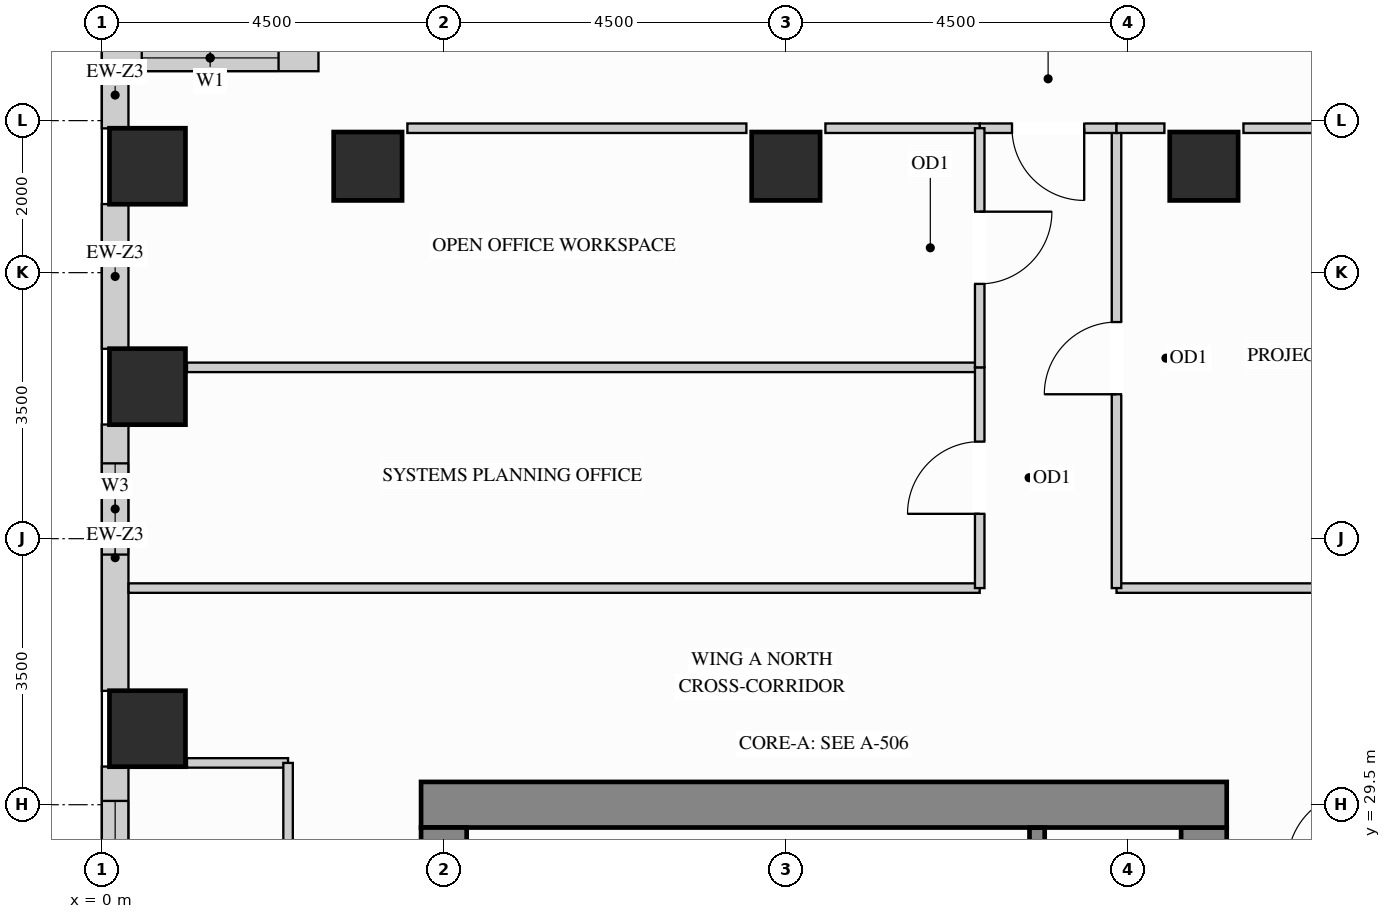
"""IFC4 building model, lengths in metres.
Left out: names, types, materials, properties, quantities, classifications, styles, units other than length and angle.
Written with IfcOpenShell. Run it as: python <this file> out.ifc"""

import sys

from ifc_helpers import new_model, si_unit, direction, frame, frame_2d, origin, origin_2d, place, context, subcontext, project, spatial, rectangle, extrude, source, transform, mapped, element, fill, save


model = new_model("IFC4")
c1 = context("Model", 3, precision=1e-05, world=origin(), true_north=direction((0.0, 1.0)))
c2 = subcontext(c1, "Body", "Model", "MODEL_VIEW")
j1 = project(units=[si_unit("LENGTHUNIT", "METRE"), si_unit("PLANEANGLEUNIT", "RADIAN")], contexts=[c1])
p1 = place(None, origin())
s1 = spatial("IfcSite", under=j1, at=p1, CompositionType="ELEMENT")
p2 = place(p1, origin())
s2 = spatial("IfcBuilding", under=s1, at=p2, CompositionType="ELEMENT")
p3 = place(p2, frame((0.0, 0.0, 171.9)))
s3 = spatial("IfcBuildingStorey", under=s2, at=p3, CompositionType="ELEMENT", Elevation=171.9)
m1 = source(origin(), c2, "Body", "SweptSolid", [
    extrude(rectangle(XDim=0.9, YDim=0.9, at=origin_2d()), origin(), (0.0, 0.0, 1.0), 3.4),
])
for number, where, z_axis, x_axis in (
    (1, (14.5, 37.9, 0.0), (0.0, 0.0, 1.0), (1.0, 0.0, 0.0)),
    (2, (3.5, 37.9, 0.0), (0.0, 0.0, 1.0), (1.0, 0.0, 0.0)),
    (3, (9.0, 37.9, 0.0), (0.0, 0.0, 1.0), (1.0, 0.0, 0.0)),
):
    element("IfcColumn", number, at=place(p3, frame(where, z_axis=z_axis, x_axis=x_axis)), inside=s3, PredefinedType="COLUMN", context=c2, shape_type="MappedRepresentation", body=[
        mapped(m1, transform((0.0, 0.0, 0.0), x_axis=(1.0, 0.0, 0.0), y_axis=(0.0, 1.0, 0.0), z_axis=(0.0, 0.0, 1.0))),
    ])
m2 = source(origin(), c2, "Body", "SweptSolid", [
    extrude(rectangle(XDim=1.0, YDim=1.0, at=origin_2d()), origin(), (0.0, 0.0, 1.0), 3.4),
])
for number, where, z_axis, x_axis in (
    (4, (0.6, 30.5, 0.0), (0.0, 0.0, 1.0), (1.0, 0.0, 0.0)),
    (5, (0.6, 35.0, 0.0), (0.0, 0.0, 1.0), (1.0, 0.0, 0.0)),
    (6, (0.6, 37.9, 0.0), (0.0, 0.0, 1.0), (1.0, 0.0, 0.0)),
):
    element("IfcColumn", number, at=place(p3, frame(where, z_axis=z_axis, x_axis=x_axis)), inside=s3, PredefinedType="COLUMN", context=c2, shape_type="MappedRepresentation", body=[
        mapped(m2, transform((0.0, 0.0, 0.0), x_axis=(1.0, 0.0, 0.0), y_axis=(0.0, 1.0, 0.0), z_axis=(0.0, 0.0, 1.0))),
    ])
m3 = source(origin(), c2, "Body", "SweptSolid", [
    extrude(rectangle(XDim=8.32, YDim=0.6, at=frame_2d((4.16, 0.0))), origin(), (0.0, 0.0, 1.0), 3.4),
])
p4 = place(p3, frame((14.5, 20.88, 0.0), z_axis=(0.0, 0.0, 1.0), x_axis=(0.0, 1.0, 0.0)))
e7 = element("IfcWall", 7, at=p4, inside=s3, PredefinedType="SHEAR", context=c2, shape_type="MappedRepresentation", body=[
    mapped(m3, transform((0.0, 0.0, 0.0), x_axis=(1.0, 0.0, 0.0), y_axis=(0.0, 1.0, 0.0), z_axis=(0.0, 0.0, 1.0))),
])
m4 = source(origin(), c2, "Body", "SweptSolid", [
    extrude(rectangle(XDim=10.6, YDim=0.6, at=frame_2d((5.3, 0.0))), origin(), (0.0, 0.0, 1.0), 3.4),
])
p5 = place(p3, frame((4.2, 29.5, 0.0), z_axis=(0.0, 0.0, 1.0), x_axis=(1.0, 0.0, 0.0)))
e8 = element("IfcWall", 8, at=p5, inside=s3, PredefinedType="SHEAR", context=c2, shape_type="MappedRepresentation", body=[
    mapped(m4, transform((0.0, 0.0, 0.0), x_axis=(1.0, 0.0, 0.0), y_axis=(0.0, 1.0, 0.0), z_axis=(0.0, 0.0, 1.0))),
])
m5 = source(origin(), c2, "Body", "SweptSolid", [
    extrude(rectangle(XDim=20.4, YDim=0.6, at=frame_2d((10.2, 0.0))), origin(), (0.0, 0.0, 1.0), 3.4),
])
p6 = place(p3, frame((4.5, 8.8, 0.0), z_axis=(0.0, 0.0, 1.0), x_axis=(0.0, 1.0, 0.0)))
e9 = element("IfcWall", 9, at=p6, inside=s3, PredefinedType="SHEAR", context=c2, shape_type="MappedRepresentation", body=[
    mapped(m5, transform((0.0, 0.0, 0.0), x_axis=(1.0, 0.0, 0.0), y_axis=(0.0, 1.0, 0.0), z_axis=(0.0, 0.0, 1.0))),
])
p7 = place(p3, frame((2.85, 39.325, 0.0), z_axis=(0.0, 0.0, 1.0), x_axis=(-1.0, 0.0, 0.0)))
e10 = element("IfcWall", 10, at=p7, inside=s3, PredefinedType="SOLIDWALL", context=c2, shape_type="SweptSolid", body=[
    extrude(rectangle(XDim=2.85, YDim=0.35, at=frame_2d((1.425, 0.0))), origin(), (0.0, 0.0, 1.0), 3.385),
])
p8 = place(p7, frame((0.525, 0.0, 0.78)))
e11 = element("IfcOpeningElement", 11, at=p8, cuts=e10, PredefinedType="OPENING", context=c2, shape_type="SweptSolid", body=[
    extrude(rectangle(XDim=1.8, YDim=2.1, at=frame_2d((0.9, 1.05))), frame((0.0, 0.185, 0.0), z_axis=(0.0, -1.0, 0.0), x_axis=(1.0, 0.0, 0.0)), (0.0, 0.0, 1.0), 0.37),
])
m6 = source(origin(), c2, "Body", "SweptSolid", [
    extrude(rectangle(XDim=0.754, YDim=0.35, at=frame_2d((0.377, 0.0))), origin(), (0.0, 0.0, 1.0), 3.385),
])
p9 = place(p3, frame((0.175, 39.152, 0.0), z_axis=(0.0, 0.0, 1.0), x_axis=(0.0, -1.0, 0.0)))
e12 = element("IfcWall", 12, at=p9, inside=s3, PredefinedType="SOLIDWALL", context=c2, shape_type="MappedRepresentation", body=[
    mapped(m6, transform((0.0, 0.0, 0.0), x_axis=(1.0, 0.0, 0.0), y_axis=(0.0, 1.0, 0.0), z_axis=(0.0, 0.0, 1.0))),
])
m7 = source(origin(), c2, "Body", "SweptSolid", [
    extrude(rectangle(XDim=1.904, YDim=0.35, at=frame_2d((0.952, 0.0))), origin(), (0.0, 0.0, 1.0), 2.612),
])
p10 = place(p3, frame((0.175, 37.402, 0.0), z_axis=(0.0, 0.0, 1.0), x_axis=(0.0, -1.0, 0.0)))
e13 = element("IfcWall", 13, at=p10, inside=s3, PredefinedType="SOLIDWALL", context=c2, shape_type="MappedRepresentation", body=[
    mapped(m7, transform((0.0, 0.0, 0.0), x_axis=(1.0, 0.0, 0.0), y_axis=(0.0, 1.0, 0.0), z_axis=(0.0, 0.0, 1.0))),
])
p11 = place(p3, frame((0.175, 34.502, 0.0), z_axis=(0.0, 0.0, 1.0), x_axis=(0.0, -1.0, 0.0)))
e14 = element("IfcWall", 14, at=p11, inside=s3, PredefinedType="SOLIDWALL", context=c2, shape_type="SweptSolid", body=[
    extrude(rectangle(XDim=3.504, YDim=0.35, at=frame_2d((1.752, 0.0))), origin(), (0.0, 0.0, 1.0), 2.612),
])
p12 = place(p11, frame((0.511, 0.0, 0.78)))
e15 = element("IfcOpeningElement", 15, at=p12, cuts=e14, PredefinedType="OPENING", context=c2, shape_type="SweptSolid", body=[
    extrude(rectangle(XDim=1.2, YDim=1.652, at=frame_2d((0.6, 0.826))), frame((0.0, 0.185, 0.0), z_axis=(0.0, -1.0, 0.0), x_axis=(1.0, 0.0, 0.0)), (0.0, 0.0, 1.0), 0.37),
])
p13 = place(p3, frame((0.175, 30.002, 0.0), z_axis=(0.0, 0.0, 1.0), x_axis=(0.0, -1.0, 0.0)))
e16 = element("IfcWall", 16, at=p13, inside=s3, PredefinedType="SOLIDWALL", context=c2, shape_type="SweptSolid", body=[
    extrude(rectangle(XDim=2.704, YDim=0.35, at=frame_2d((1.352, 0.0))), origin(), (0.0, 0.0, 1.0), 2.612),
])
p14 = place(p13, frame((0.452, 0.0, 0.78)))
e17 = element("IfcOpeningElement", 17, at=p14, cuts=e16, PredefinedType="OPENING", context=c2, shape_type="SweptSolid", body=[
    extrude(rectangle(XDim=1.8, YDim=1.652, at=frame_2d((0.9, 0.826))), frame((0.0, 0.185, 0.0), z_axis=(0.0, -1.0, 0.0), x_axis=(1.0, 0.0, 0.0)), (0.0, 0.0, 1.0), 0.37),
])
m8 = source(origin(), c2, "Body", "SweptSolid", [
    extrude(rectangle(XDim=5.798, YDim=0.125, at=frame_2d((2.899, 0.0))), origin(), (0.0, 0.0, 1.0), 3.385),
])
p15 = place(p3, frame((13.35, 32.35, 0.0), z_axis=(0.0, 0.0, 1.0), x_axis=(1.0, 0.0, 0.0)))
e18 = element("IfcWall", 18, at=p15, inside=s3, PredefinedType="PARTITIONING", context=c2, shape_type="MappedRepresentation", body=[
    mapped(m8, transform((0.0, 0.0, 0.0), x_axis=(1.0, 0.0, 0.0), y_axis=(0.0, 1.0, 0.0), z_axis=(0.0, 0.0, 1.0))),
])
m9 = source(origin(), c2, "Body", "SweptSolid", [
    extrude(rectangle(XDim=11.198, YDim=0.125, at=frame_2d((5.599, 0.0))), origin(), (0.0, 0.0, 1.0), 3.385),
])
p16 = place(p3, frame((0.352, 32.35, 0.0), z_axis=(0.0, 0.0, 1.0), x_axis=(1.0, 0.0, 0.0)))
e19 = element("IfcWall", 19, at=p16, inside=s3, PredefinedType="PARTITIONING", context=c2, shape_type="MappedRepresentation", body=[
    mapped(m9, transform((0.0, 0.0, 0.0), x_axis=(1.0, 0.0, 0.0), y_axis=(0.0, 1.0, 0.0), z_axis=(0.0, 0.0, 1.0))),
])
m10 = source(origin(), c2, "Body", "SweptSolid", [
    extrude(rectangle(XDim=10.43, YDim=0.125, at=frame_2d((5.215, 0.0))), origin(), (0.0, 0.0, 1.0), 3.385),
])
p17 = place(p3, frame((1.12, 35.254, 0.0), z_axis=(0.0, 0.0, 1.0), x_axis=(1.0, 0.0, 0.0)))
e20 = element("IfcWall", 20, at=p17, inside=s3, PredefinedType="PARTITIONING", context=c2, shape_type="MappedRepresentation", body=[
    mapped(m10, transform((0.0, 0.0, 0.0), x_axis=(1.0, 0.0, 0.0), y_axis=(0.0, 1.0, 0.0), z_axis=(0.0, 0.0, 1.0))),
])
m11 = source(origin(), c2, "Body", "SweptSolid", [
    extrude(rectangle(XDim=1.33, YDim=0.125, at=frame_2d((0.665, 0.0))), origin(), (0.0, 0.0, 1.0), 3.385),
])
p18 = place(p3, frame((1.12, 30.05, 0.0), z_axis=(0.0, 0.0, 1.0), x_axis=(1.0, 0.0, 0.0)))
e21 = element("IfcWall", 21, at=p18, inside=s3, PredefinedType="PARTITIONING", context=c2, shape_type="MappedRepresentation", body=[
    mapped(m11, transform((0.0, 0.0, 0.0), x_axis=(1.0, 0.0, 0.0), y_axis=(0.0, 1.0, 0.0), z_axis=(0.0, 0.0, 1.0))),
])
p19 = place(p3, frame((13.35, 32.35, 0.0), z_axis=(0.0, 0.0, 1.0), x_axis=(0.0, 1.0, 0.0)))
e22 = element("IfcWall", 22, at=p19, inside=s3, PredefinedType="PARTITIONING", context=c2, shape_type="SweptSolid", body=[
    extrude(rectangle(XDim=6.05, YDim=0.125, at=frame_2d((3.025, 0.0))), origin(), (0.0, 0.0, 1.0), 3.385),
])
p20 = place(p19, frame((2.55, 0.0, 0.0)))
e23 = element("IfcOpeningElement", 23, at=p20, cuts=e22, PredefinedType="OPENING", context=c2, shape_type="SweptSolid", body=[
    extrude(rectangle(XDim=0.95, YDim=2.15, at=frame_2d((0.475, 1.075))), frame((0.0, 0.073, 0.0), z_axis=(0.0, -1.0, 0.0), x_axis=(1.0, 0.0, 0.0)), (0.0, 0.0, 1.0), 0.145),
])
p21 = place(p3, frame((11.55, 38.4, 0.0), z_axis=(0.0, 0.0, 1.0), x_axis=(1.0, 0.0, 0.0)))
e24 = element("IfcWall", 24, at=p21, inside=s3, PredefinedType="PARTITIONING", context=c2, shape_type="SweptSolid", body=[
    extrude(rectangle(XDim=1.8, YDim=0.125, at=frame_2d((0.9, 0.0))), origin(), (0.0, 0.0, 1.0), 3.385),
])
p22 = place(p21, frame((0.425, 0.0, 0.0)))
e25 = element("IfcOpeningElement", 25, at=p22, cuts=e24, PredefinedType="OPENING", context=c2, shape_type="SweptSolid", body=[
    extrude(rectangle(XDim=0.95, YDim=2.15, at=frame_2d((0.475, 1.075))), frame((0.0, 0.073, 0.0), z_axis=(0.0, -1.0, 0.0), x_axis=(1.0, 0.0, 0.0)), (0.0, 0.0, 1.0), 0.145),
])
m12 = source(origin(), c2, "Body", "SweptSolid", [
    extrude(rectangle(XDim=0.63, YDim=0.125, at=frame_2d((0.315, 0.0))), origin(), (0.0, 0.0, 1.0), 3.385),
])
p23 = place(p3, frame((13.35, 38.4, 0.0), z_axis=(0.0, 0.0, 1.0), x_axis=(1.0, 0.0, 0.0)))
e26 = element("IfcWall", 26, at=p23, inside=s3, PredefinedType="PARTITIONING", context=c2, shape_type="MappedRepresentation", body=[
    mapped(m12, transform((0.0, 0.0, 0.0), x_axis=(1.0, 0.0, 0.0), y_axis=(0.0, 1.0, 0.0), z_axis=(0.0, 0.0, 1.0))),
])
m13 = source(origin(), c2, "Body", "SweptSolid", [
    extrude(rectangle(XDim=1.88, YDim=0.125, at=frame_2d((0.94, 0.0))), origin(), (0.0, 0.0, 1.0), 3.385),
])
p24 = place(p3, frame((15.02, 38.4, 0.0), z_axis=(0.0, 0.0, 1.0), x_axis=(1.0, 0.0, 0.0)))
e27 = element("IfcWall", 27, at=p24, inside=s3, PredefinedType="PARTITIONING", context=c2, shape_type="MappedRepresentation", body=[
    mapped(m13, transform((0.0, 0.0, 0.0), x_axis=(1.0, 0.0, 0.0), y_axis=(0.0, 1.0, 0.0), z_axis=(0.0, 0.0, 1.0))),
])
m14 = source(origin(), c2, "Body", "SweptSolid", [
    extrude(rectangle(XDim=4.46, YDim=0.125, at=frame_2d((2.23, 0.0))), origin(), (0.0, 0.0, 1.0), 3.385),
])
p25 = place(p3, frame((4.02, 38.4, 0.0), z_axis=(0.0, 0.0, 1.0), x_axis=(1.0, 0.0, 0.0)))
e28 = element("IfcWall", 28, at=p25, inside=s3, PredefinedType="PARTITIONING", context=c2, shape_type="MappedRepresentation", body=[
    mapped(m14, transform((0.0, 0.0, 0.0), x_axis=(1.0, 0.0, 0.0), y_axis=(0.0, 1.0, 0.0), z_axis=(0.0, 0.0, 1.0))),
])
m15 = source(origin(), c2, "Body", "SweptSolid", [
    extrude(rectangle(XDim=2.03, YDim=0.125, at=frame_2d((1.015, 0.0))), origin(), (0.0, 0.0, 1.0), 3.385),
])
p26 = place(p3, frame((9.52, 38.4, 0.0), z_axis=(0.0, 0.0, 1.0), x_axis=(1.0, 0.0, 0.0)))
e29 = element("IfcWall", 29, at=p26, inside=s3, PredefinedType="PARTITIONING", context=c2, shape_type="MappedRepresentation", body=[
    mapped(m15, transform((0.0, 0.0, 0.0), x_axis=(1.0, 0.0, 0.0), y_axis=(0.0, 1.0, 0.0), z_axis=(0.0, 0.0, 1.0))),
])
p27 = place(p3, frame((11.55, 32.35, 0.0), z_axis=(0.0, 0.0, 1.0), x_axis=(0.0, 1.0, 0.0)))
e30 = element("IfcWall", 30, at=p27, inside=s3, PredefinedType="PARTITIONING", context=c2, shape_type="SweptSolid", body=[
    extrude(rectangle(XDim=2.904, YDim=0.125, at=frame_2d((1.452, 0.0))), origin(), (0.0, 0.0, 1.0), 3.385),
])
p28 = place(p27, frame((0.977, 0.0, 0.0)))
e31 = element("IfcOpeningElement", 31, at=p28, cuts=e30, PredefinedType="OPENING", context=c2, shape_type="SweptSolid", body=[
    extrude(rectangle(XDim=0.95, YDim=2.15, at=frame_2d((0.475, 1.075))), frame((0.0, 0.073, 0.0), z_axis=(0.0, -1.0, 0.0), x_axis=(1.0, 0.0, 0.0)), (0.0, 0.0, 1.0), 0.145),
])
p29 = place(p3, frame((11.55, 35.254, 0.0), z_axis=(0.0, 0.0, 1.0), x_axis=(0.0, 1.0, 0.0)))
e32 = element("IfcWall", 32, at=p29, inside=s3, PredefinedType="PARTITIONING", context=c2, shape_type="SweptSolid", body=[
    extrude(rectangle(XDim=3.146, YDim=0.125, at=frame_2d((1.573, 0.0))), origin(), (0.0, 0.0, 1.0), 3.385),
])
p30 = place(p29, frame((1.098, 0.0, 0.0)))
e33 = element("IfcOpeningElement", 33, at=p30, cuts=e32, PredefinedType="OPENING", context=c2, shape_type="SweptSolid", body=[
    extrude(rectangle(XDim=0.95, YDim=2.15, at=frame_2d((0.475, 1.075))), frame((0.0, 0.073, 0.0), z_axis=(0.0, -1.0, 0.0), x_axis=(1.0, 0.0, 0.0)), (0.0, 0.0, 1.0), 0.145),
])
p31 = place(p3, frame((2.45, 22.6, 0.0), z_axis=(0.0, 0.0, 1.0), x_axis=(0.0, 1.0, 0.0)))
e34 = element("IfcWall", 34, at=p31, inside=s3, PredefinedType="PARTITIONING", context=c2, shape_type="SweptSolid", body=[
    extrude(rectangle(XDim=7.45, YDim=0.125, at=frame_2d((3.725, 0.0))), origin(), (0.0, 0.0, 1.0), 3.385),
])
p32 = place(p31, frame((3.25, 0.0, 0.0)))
e35 = element("IfcOpeningElement", 35, at=p32, cuts=e34, PredefinedType="OPENING", context=c2, shape_type="SweptSolid", body=[
    extrude(rectangle(XDim=0.95, YDim=2.15, at=frame_2d((0.475, 1.075))), frame((0.0, 0.073, 0.0), z_axis=(0.0, -1.0, 0.0), x_axis=(1.0, 0.0, 0.0)), (0.0, 0.0, 1.0), 0.145),
])
m16 = source(origin(), c2, "Body", "SweptSolid", [
    extrude(rectangle(XDim=3.753, YDim=0.2, at=frame_2d((1.876, 0.0))), origin(), (0.0, 0.0, 1.0), 3.4),
])
p33 = place(p3, frame((12.305, 25.445, 0.0), z_axis=(0.0, 0.0, 1.0), x_axis=(0.0, 1.0, 0.0)))
e36 = element("IfcWall", 36, at=p33, inside=s3, PredefinedType="SHEAR", context=c2, shape_type="MappedRepresentation", body=[
    mapped(m16, transform((0.0, 0.0, 0.0), x_axis=(1.0, 0.0, 0.0), y_axis=(0.0, 1.0, 0.0), z_axis=(0.0, 0.0, 1.0))),
])
m17 = source(origin(), c2, "Body", "SweptSolid", [
    extrude(rectangle(XDim=0.95, YDim=2.15, at=frame_2d((0.475, 1.075))), frame((0.0, 0.025, 0.0), z_axis=(0.0, -1.0, 0.0), x_axis=(1.0, 0.0, 0.0)), (0.0, 0.0, 1.0), 0.05),
])
p34 = place(p20, origin())
e37 = element("IfcDoor", 37, at=p34, inside=s3, OperationType="SINGLE_SWING_LEFT", PredefinedType="DOOR", context=c2, shape_type="MappedRepresentation", body=[
    mapped(m17, transform((0.0, 0.0, 0.0), x_axis=(1.0, 0.0, 0.0), y_axis=(0.0, 1.0, 0.0), z_axis=(0.0, 0.0, 1.0))),
])
fill(e23, e37)
p35 = place(p22, origin())
e38 = element("IfcDoor", 38, at=p35, inside=s3, OperationType="SINGLE_SWING_RIGHT", PredefinedType="DOOR", context=c2, shape_type="MappedRepresentation", body=[
    mapped(m17, transform((0.0, 0.0, 0.0), x_axis=(1.0, 0.0, 0.0), y_axis=(0.0, 1.0, 0.0), z_axis=(0.0, 0.0, 1.0))),
])
fill(e25, e38)
p36 = place(p28, origin())
e39 = element("IfcDoor", 39, at=p36, inside=s3, OperationType="SINGLE_SWING_LEFT", PredefinedType="DOOR", context=c2, shape_type="MappedRepresentation", body=[
    mapped(m17, transform((0.0, 0.0, 0.0), x_axis=(1.0, 0.0, 0.0), y_axis=(0.0, 1.0, 0.0), z_axis=(0.0, 0.0, 1.0))),
])
fill(e31, e39)
p37 = place(p30, origin())
e40 = element("IfcDoor", 40, at=p37, inside=s3, OperationType="SINGLE_SWING_RIGHT", PredefinedType="DOOR", context=c2, shape_type="MappedRepresentation", body=[
    mapped(m17, transform((0.0, 0.0, 0.0), x_axis=(1.0, 0.0, 0.0), y_axis=(0.0, 1.0, 0.0), z_axis=(0.0, 0.0, 1.0))),
])
fill(e33, e40)
m18 = source(origin(), c2, "Body", "SweptSolid", [
    extrude(rectangle(XDim=1.8, YDim=2.1, at=frame_2d((0.9, 1.05))), frame((0.0, 0.03, 0.0), z_axis=(0.0, -1.0, 0.0), x_axis=(1.0, 0.0, 0.0)), (0.0, 0.0, 1.0), 0.06),
])
p38 = place(p8, origin())
e41 = element("IfcWindow", 41, at=p38, inside=s3, PartitioningType="SINGLE_PANEL", PredefinedType="WINDOW", context=c2, shape_type="MappedRepresentation", body=[
    mapped(m18, transform((0.0, 0.0, 0.0), x_axis=(1.0, 0.0, 0.0), y_axis=(0.0, 1.0, 0.0), z_axis=(0.0, 0.0, 1.0))),
])
fill(e11, e41)
m19 = source(origin(), c2, "Body", "SweptSolid", [
    extrude(rectangle(XDim=1.8, YDim=1.652, at=frame_2d((0.9, 0.826))), frame((0.0, 0.03, 0.0), z_axis=(0.0, -1.0, 0.0), x_axis=(1.0, 0.0, 0.0)), (0.0, 0.0, 1.0), 0.06),
])
p39 = place(p14, origin())
e42 = element("IfcWindow", 42, at=p39, inside=s3, PartitioningType="SINGLE_PANEL", PredefinedType="WINDOW", context=c2, shape_type="MappedRepresentation", body=[
    mapped(m19, transform((0.0, 0.0, 0.0), x_axis=(1.0, 0.0, 0.0), y_axis=(0.0, 1.0, 0.0), z_axis=(0.0, 0.0, 1.0))),
])
fill(e17, e42)
m20 = source(origin(), c2, "Body", "SweptSolid", [
    extrude(rectangle(XDim=1.2, YDim=1.652, at=frame_2d((0.6, 0.826))), frame((0.0, 0.03, 0.0), z_axis=(0.0, -1.0, 0.0), x_axis=(1.0, 0.0, 0.0)), (0.0, 0.0, 1.0), 0.06),
])
p40 = place(p12, origin())
e43 = element("IfcWindow", 43, at=p40, inside=s3, PartitioningType="SINGLE_PANEL", PredefinedType="WINDOW", context=c2, shape_type="MappedRepresentation", body=[
    mapped(m20, transform((0.0, 0.0, 0.0), x_axis=(1.0, 0.0, 0.0), y_axis=(0.0, 1.0, 0.0), z_axis=(0.0, 0.0, 1.0))),
])
fill(e15, e43)
save(model, sys.argv[1])
